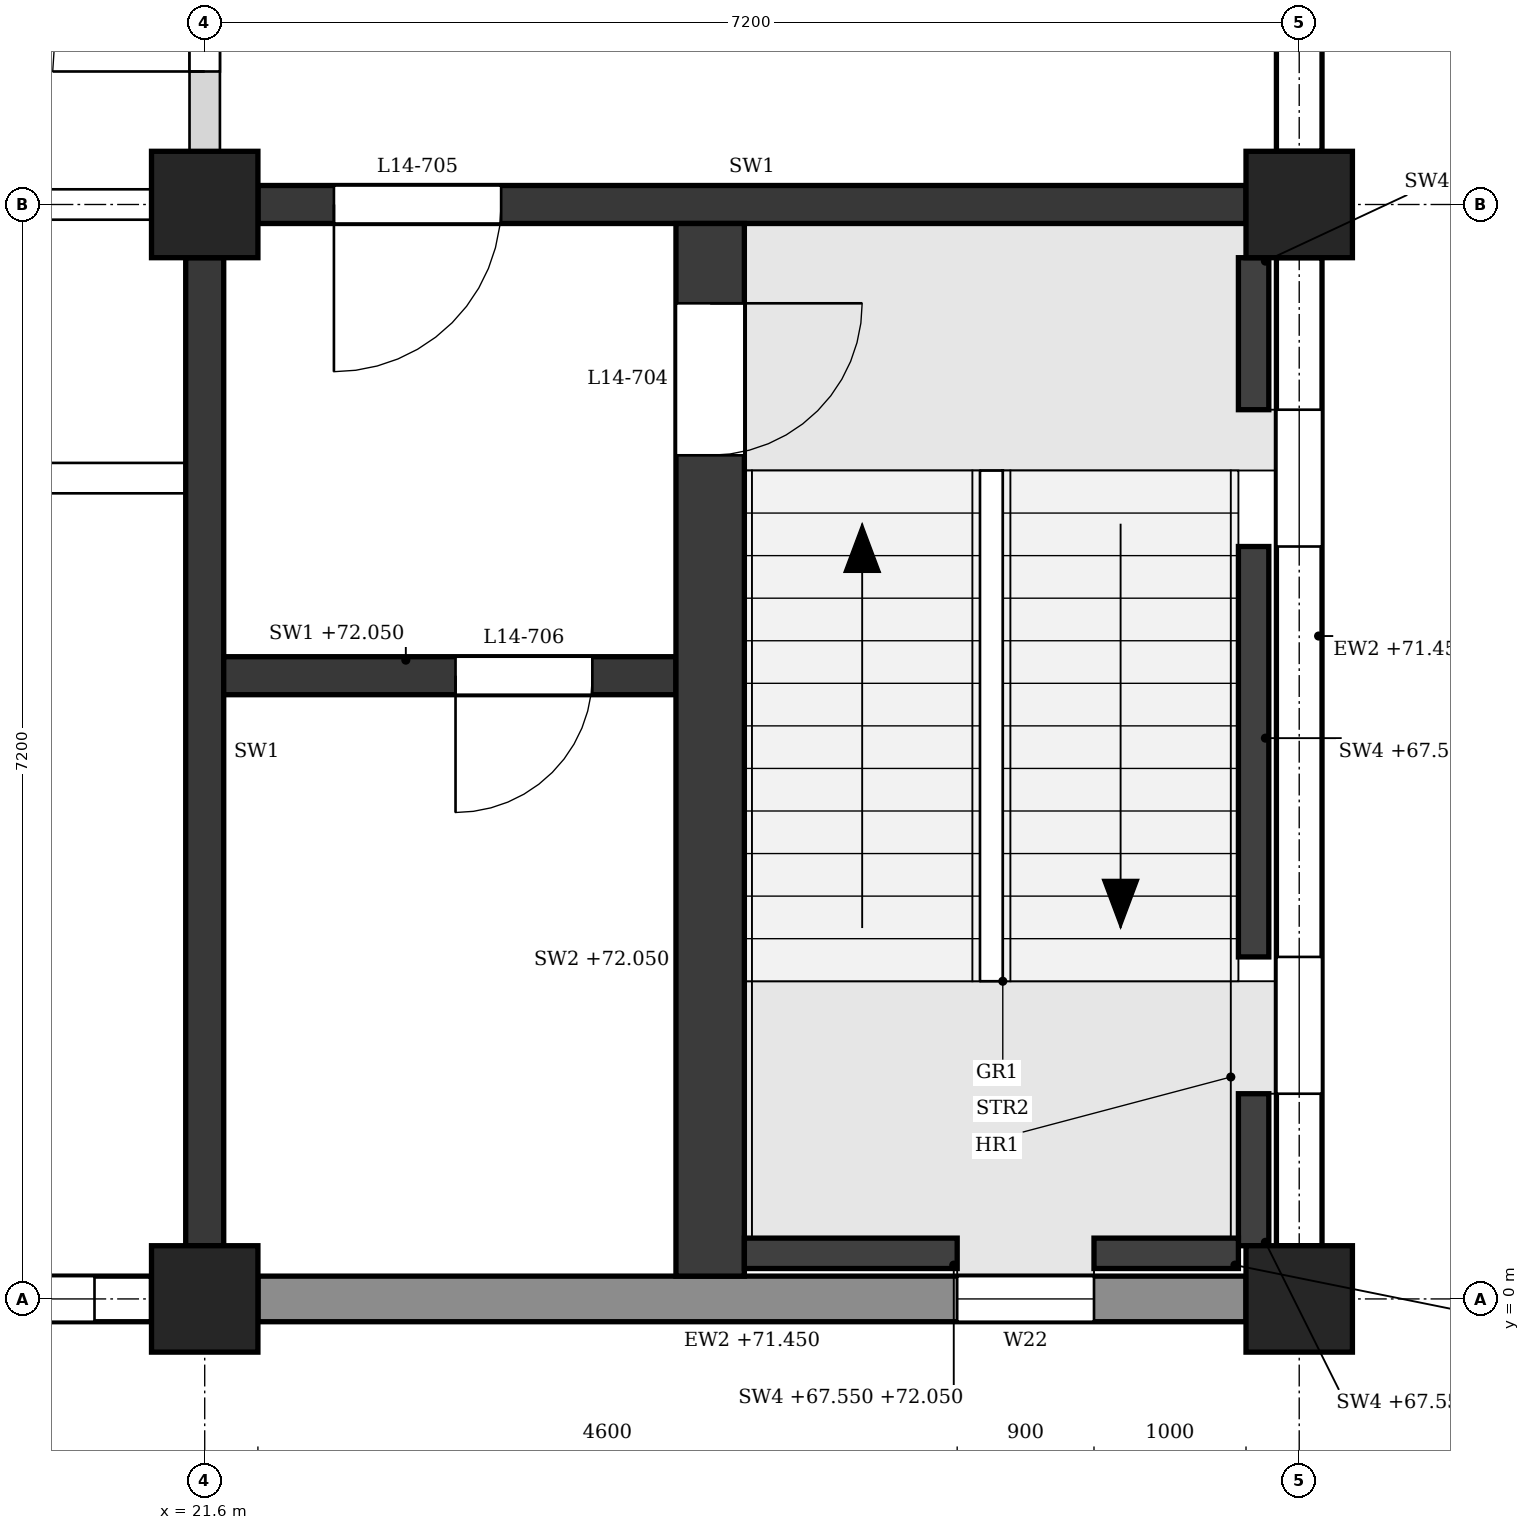
"""IFC4 building model, lengths in metres.
Left out: names, types, materials, properties, quantities, classifications, styles, units other than length and angle.
Written with IfcOpenShell. Run it as: python <this file> out.ifc"""

import sys

from ifc_helpers import new_model, si_unit, direction, frame, frame_2d, origin, origin_2d, place, context, subcontext, project, spatial, polyline, rectangle, outline, extrude, element, fill, save


model = new_model("IFC4")
c1 = context("Model", 3, precision=1e-05, world=origin(), true_north=direction((0.0, 1.0)))
c2 = subcontext(c1, "Body", "Model", "MODEL_VIEW")
j1 = project(units=[si_unit("LENGTHUNIT", "METRE"), si_unit("PLANEANGLEUNIT", "RADIAN")], contexts=[c1])
p1 = place(None, origin())
s1 = spatial("IfcSite", under=j1, at=p1, CompositionType="ELEMENT")
p2 = place(p1, origin())
s2 = spatial("IfcBuilding", under=s1, at=p2, CompositionType="ELEMENT")
p3 = place(p2, frame((0.0, 0.0, 67.8)))
s3 = spatial("IfcBuildingStorey", under=s2, at=p3, CompositionType="ELEMENT", Elevation=67.8)
for number, where, z_axis, x_axis in (
    (1, (21.6, 0.0, 0.0), (0.0, 0.0, 1.0), (1.0, 0.0, 0.0)),
    (2, (21.6, 7.2, 0.0), (0.0, 0.0, 1.0), (1.0, 0.0, 0.0)),
    (3, (28.8, 0.0, 0.0), (0.0, 0.0, 1.0), (1.0, 0.0, 0.0)),
    (4, (28.8, 7.2, 0.0), (0.0, 0.0, 1.0), (1.0, 0.0, 0.0)),
):
    element("IfcColumn", number, at=place(p3, frame(where, z_axis=z_axis, x_axis=x_axis)), inside=s3, PredefinedType="COLUMN", context=c2, shape_type="SweptSolid", body=[
        extrude(rectangle(XDim=0.7, YDim=0.7, at=origin_2d()), origin(), (0.0, 0.0, 1.0), 4.5),
    ])
p4 = place(p3, frame((14.75, 0.0, 0.0), z_axis=(0.0, 0.0, 1.0), x_axis=(1.0, 0.0, 0.0)))
e5 = element("IfcWall", 5, at=p4, inside=s3, PredefinedType="STANDARD", context=c2, shape_type="SweptSolid", body=[
    extrude(rectangle(XDim=6.5, YDim=0.3, at=frame_2d((3.25, 0.0))), origin(), (0.0, 0.0, 1.0), 3.65),
])
p5 = place(p4, frame((0.375, 0.0, 1.5)))
e6 = element("IfcOpeningElement", 6, at=p5, cuts=e5, PredefinedType="OPENING", context=c2, shape_type="SweptSolid", body=[
    extrude(outline(polyline([(0.0, 0.0), (0.45, 0.0), (0.45, 1.85), (0.225, 2.1), (0.0, 1.85), (0.0, 0.0)])), frame((0.0, 0.16, 0.0), z_axis=(0.0, -1.0, 0.0), x_axis=(1.0, 0.0, 0.0)), (0.0, 0.0, 1.0), 0.32),
])
p6 = place(p4, frame((1.075, 0.0, 0.9)))
e7 = element("IfcOpeningElement", 7, at=p6, cuts=e5, PredefinedType="OPENING", context=c2, shape_type="SweptSolid", body=[
    extrude(outline(polyline([(0.0, 0.0), (0.75, 0.0), (0.75, 2.25), (0.375, 2.7), (0.0, 2.25), (0.0, 0.0)])), frame((0.0, 0.16, 0.0), z_axis=(0.0, -1.0, 0.0), x_axis=(1.0, 0.0, 0.0)), (0.0, 0.0, 1.0), 0.32),
])
p7 = place(p4, frame((2.075, 0.0, 1.5)))
e8 = element("IfcOpeningElement", 8, at=p7, cuts=e5, PredefinedType="OPENING", context=c2, shape_type="SweptSolid", body=[
    extrude(outline(polyline([(0.0, 0.0), (0.45, 0.0), (0.45, 1.85), (0.225, 2.1), (0.0, 1.85), (0.0, 0.0)])), frame((0.0, 0.16, 0.0), z_axis=(0.0, -1.0, 0.0), x_axis=(1.0, 0.0, 0.0)), (0.0, 0.0, 1.0), 0.32),
])
p8 = place(p4, frame((3.975, 0.0, 1.5)))
e9 = element("IfcOpeningElement", 9, at=p8, cuts=e5, PredefinedType="OPENING", context=c2, shape_type="SweptSolid", body=[
    extrude(outline(polyline([(0.0, 0.0), (0.45, 0.0), (0.45, 1.85), (0.225, 2.1), (0.0, 1.85), (0.0, 0.0)])), frame((0.0, 0.16, 0.0), z_axis=(0.0, -1.0, 0.0), x_axis=(1.0, 0.0, 0.0)), (0.0, 0.0, 1.0), 0.32),
])
p9 = place(p4, frame((4.675, 0.0, 0.9)))
e10 = element("IfcOpeningElement", 10, at=p9, cuts=e5, PredefinedType="OPENING", context=c2, shape_type="SweptSolid", body=[
    extrude(outline(polyline([(0.0, 0.0), (0.75, 0.0), (0.75, 2.25), (0.375, 2.7), (0.0, 2.25), (0.0, 0.0)])), frame((0.0, 0.16, 0.0), z_axis=(0.0, -1.0, 0.0), x_axis=(1.0, 0.0, 0.0)), (0.0, 0.0, 1.0), 0.32),
])
p10 = place(p4, frame((5.675, 0.0, 1.5)))
e11 = element("IfcOpeningElement", 11, at=p10, cuts=e5, PredefinedType="OPENING", context=c2, shape_type="SweptSolid", body=[
    extrude(outline(polyline([(0.0, 0.0), (0.45, 0.0), (0.45, 1.85), (0.225, 2.1), (0.0, 1.85), (0.0, 0.0)])), frame((0.0, 0.16, 0.0), z_axis=(0.0, -1.0, 0.0), x_axis=(1.0, 0.0, 0.0)), (0.0, 0.0, 1.0), 0.32),
])
p11 = place(p3, frame((21.95, 0.0, 0.0), z_axis=(0.0, 0.0, 1.0), x_axis=(1.0, 0.0, 0.0)))
e12 = element("IfcWall", 12, at=p11, inside=s3, PredefinedType="STANDARD", context=c2, shape_type="SweptSolid", body=[
    extrude(rectangle(XDim=6.5, YDim=0.3, at=frame_2d((3.25, 0.0))), origin(), (0.0, 0.0, 1.0), 3.65),
])
p12 = place(p11, frame((4.6, 0.0, 0.9)))
e13 = element("IfcOpeningElement", 13, at=p12, cuts=e12, PredefinedType="OPENING", context=c2, shape_type="SweptSolid", body=[
    extrude(outline(polyline([(0.0, 0.0), (0.9, 0.0), (0.9, 2.25), (0.45, 2.7), (0.0, 2.25), (0.0, 0.0)])), frame((0.0, 0.16, 0.0), z_axis=(0.0, -1.0, 0.0), x_axis=(1.0, 0.0, 0.0)), (0.0, 0.0, 1.0), 0.32),
])
p13 = place(p3, frame((28.8, 0.35, 0.0), z_axis=(0.0, 0.0, 1.0), x_axis=(0.0, 1.0, 0.0)))
e14 = element("IfcWall", 14, at=p13, inside=s3, PredefinedType="STANDARD", context=c2, shape_type="SweptSolid", body=[
    extrude(rectangle(XDim=6.5, YDim=0.3, at=frame_2d((3.25, 0.0))), origin(), (0.0, 0.0, 1.0), 3.65),
])
p14 = place(p13, frame((1.0, 0.0, 0.9)))
e15 = element("IfcOpeningElement", 15, at=p14, cuts=e14, PredefinedType="OPENING", context=c2, shape_type="SweptSolid", body=[
    extrude(outline(polyline([(0.0, 0.0), (0.9, 0.0), (0.9, 2.25), (0.45, 2.7), (0.0, 2.25), (0.0, 0.0)])), frame((0.0, 0.16, 0.0), z_axis=(0.0, -1.0, 0.0), x_axis=(1.0, 0.0, 0.0)), (0.0, 0.0, 1.0), 0.32),
])
p15 = place(p13, frame((4.6, 0.0, 0.9)))
e16 = element("IfcOpeningElement", 16, at=p15, cuts=e14, PredefinedType="OPENING", context=c2, shape_type="SweptSolid", body=[
    extrude(outline(polyline([(0.0, 0.0), (0.9, 0.0), (0.9, 2.25), (0.45, 2.7), (0.0, 2.25), (0.0, 0.0)])), frame((0.0, 0.16, 0.0), z_axis=(0.0, -1.0, 0.0), x_axis=(1.0, 0.0, 0.0)), (0.0, 0.0, 1.0), 0.32),
])
p16 = place(p3, frame((28.8, 7.55, 0.0), z_axis=(0.0, 0.0, 1.0), x_axis=(0.0, 1.0, 0.0)))
e17 = element("IfcWall", 17, at=p16, inside=s3, PredefinedType="STANDARD", context=c2, shape_type="SweptSolid", body=[
    extrude(rectangle(XDim=6.5, YDim=0.3, at=frame_2d((3.25, 0.0))), origin(), (0.0, 0.0, 1.0), 3.65),
])
p17 = place(p16, frame((0.7, 0.0, 0.9)))
e18 = element("IfcOpeningElement", 18, at=p17, cuts=e17, PredefinedType="OPENING", context=c2, shape_type="SweptSolid", body=[
    extrude(outline(polyline([(0.0, 0.0), (1.5, 0.0), (1.5, 1.95), (0.75, 2.7), (0.0, 1.95), (0.0, 0.0)])), frame((0.0, 0.16, 0.0), z_axis=(0.0, -1.0, 0.0), x_axis=(1.0, 0.0, 0.0)), (0.0, 0.0, 1.0), 0.32),
])
p18 = place(p3, frame((21.95, 7.2, 0.0), z_axis=(0.0, 0.0, 1.0), x_axis=(1.0, 0.0, 0.0)))
e19 = element("IfcWall", 19, at=p18, inside=s3, PredefinedType="SHEAR", context=c2, shape_type="SweptSolid", body=[
    extrude(rectangle(XDim=6.5, YDim=0.25, at=frame_2d((3.25, 0.0))), origin(), (0.0, 0.0, 1.0), 3.6),
])
p19 = place(p18, frame((0.5, 0.0, 0.0)))
e20 = element("IfcOpeningElement", 20, at=p19, cuts=e19, PredefinedType="OPENING", context=c2, shape_type="SweptSolid", body=[
    extrude(rectangle(XDim=1.1, YDim=2.1, at=frame_2d((0.55, 1.05))), frame((0.0, 0.135, 0.0), z_axis=(0.0, -1.0, 0.0), x_axis=(1.0, 0.0, 0.0)), (0.0, 0.0, 1.0), 0.27),
])
p20 = place(p3, frame((21.6, 0.35, 0.0), z_axis=(0.0, 0.0, 1.0), x_axis=(0.0, 1.0, 0.0)))
e21 = element("IfcWall", 21, at=p20, inside=s3, PredefinedType="SHEAR", context=c2, shape_type="SweptSolid", body=[
    extrude(rectangle(XDim=6.5, YDim=0.25, at=frame_2d((3.25, 0.0))), origin(), (0.0, 0.0, 1.0), 3.6),
])
p21 = place(p3, frame((28.5, 0.35, -0.25), z_axis=(0.0, 0.0, 1.0), x_axis=(0.0, 1.0, 0.0)))
e22 = element("IfcWall", 22, at=p21, inside=s3, PredefinedType="SHEAR", context=c2, shape_type="SweptSolid", body=[
    extrude(rectangle(XDim=1.0, YDim=0.2, at=frame_2d((0.5, 0.0))), origin(), (0.0, 0.0, 1.0), 4.5),
])
p22 = place(p3, frame((28.5, 2.25, -0.25), z_axis=(0.0, 0.0, 1.0), x_axis=(0.0, 1.0, 0.0)))
e23 = element("IfcWall", 23, at=p22, inside=s3, PredefinedType="SHEAR", context=c2, shape_type="SweptSolid", body=[
    extrude(rectangle(XDim=2.7, YDim=0.2, at=frame_2d((1.35, 0.0))), origin(), (0.0, 0.0, 1.0), 4.5),
])
p23 = place(p3, frame((28.5, 5.85, -0.25), z_axis=(0.0, 0.0, 1.0), x_axis=(0.0, 1.0, 0.0)))
e24 = element("IfcWall", 24, at=p23, inside=s3, PredefinedType="SHEAR", context=c2, shape_type="SweptSolid", body=[
    extrude(rectangle(XDim=1.0, YDim=0.2, at=frame_2d((0.5, 0.0))), origin(), (0.0, 0.0, 1.0), 4.5),
])
p24 = place(p3, frame((25.15, 0.3, -0.25), z_axis=(0.0, 0.0, 1.0), x_axis=(1.0, 0.0, 0.0)))
e25 = element("IfcWall", 25, at=p24, inside=s3, PredefinedType="SHEAR", context=c2, shape_type="SweptSolid", body=[
    extrude(rectangle(XDim=1.4, YDim=0.2, at=frame_2d((0.7, 0.0))), origin(), (0.0, 0.0, 1.0), 4.5),
])
p25 = place(p3, frame((27.45, 0.3, -0.25), z_axis=(0.0, 0.0, 1.0), x_axis=(1.0, 0.0, 0.0)))
e26 = element("IfcWall", 26, at=p25, inside=s3, PredefinedType="SHEAR", context=c2, shape_type="SweptSolid", body=[
    extrude(rectangle(XDim=0.95, YDim=0.2, at=frame_2d((0.475, 0.0))), origin(), (0.0, 0.0, 1.0), 4.5),
])
p26 = place(p3, frame((24.925, 0.15, 0.0), z_axis=(0.0, 0.0, 1.0), x_axis=(0.0, 1.0, 0.0)))
e27 = element("IfcWall", 27, at=p26, inside=s3, PredefinedType="SHEAR", context=c2, shape_type="SweptSolid", body=[
    extrude(rectangle(XDim=6.925, YDim=0.45, at=frame_2d((3.462, 0.0))), origin(), (0.0, 0.0, 1.0), 4.25),
])
p27 = place(p26, frame((5.4, 0.0, 0.0)))
e28 = element("IfcOpeningElement", 28, at=p27, cuts=e27, PredefinedType="OPENING", context=c2, shape_type="SweptSolid", body=[
    extrude(rectangle(XDim=1.0, YDim=2.1, at=frame_2d((0.5, 1.05))), frame((0.0, 0.235, 0.0), z_axis=(0.0, -1.0, 0.0), x_axis=(1.0, 0.0, 0.0)), (0.0, 0.0, 1.0), 0.47),
])
p28 = place(p3, frame((21.725, 4.1, 0.0), z_axis=(0.0, 0.0, 1.0), x_axis=(1.0, 0.0, 0.0)))
e29 = element("IfcWall", 29, at=p28, inside=s3, PredefinedType="SHEAR", context=c2, shape_type="SweptSolid", body=[
    extrude(rectangle(XDim=2.975, YDim=0.25, at=frame_2d((1.487, 0.0))), origin(), (0.0, 0.0, 1.0), 4.25),
])
p29 = place(p28, frame((1.525, 0.0, 0.0)))
e30 = element("IfcOpeningElement", 30, at=p29, cuts=e29, PredefinedType="OPENING", context=c2, shape_type="SweptSolid", body=[
    extrude(rectangle(XDim=0.9, YDim=2.1, at=frame_2d((0.45, 1.05))), frame((0.0, 0.135, 0.0), z_axis=(0.0, -1.0, 0.0), x_axis=(1.0, 0.0, 0.0)), (0.0, 0.0, 1.0), 0.27),
])
p30 = place(p3, frame((7.325, 5.4, 0.0), z_axis=(0.0, 0.0, 1.0), x_axis=(1.0, 0.0, 0.0)))
e31 = element("IfcWall", 31, at=p30, inside=s3, PredefinedType="PARTITIONING", context=c2, shape_type="SweptSolid", body=[
    extrude(outline(polyline([(0.0, 0.0), (14.15, 0.0), (14.15, 3.6), (14.075, 3.6), (14.075, 4.25), (7.275, 4.25), (7.275, 3.6), (6.875, 3.6), (6.875, 4.25), (0.075, 4.25), (0.075, 3.6), (0.0, 3.6), (0.0, 0.0)])), frame((0.0, 0.1, 0.0), z_axis=(0.0, -1.0, 0.0), x_axis=(1.0, 0.0, 0.0)), (0.0, 0.0, 1.0), 0.2),
])
p31 = place(p30, frame((1.238, 0.0, 0.0)))
e32 = element("IfcOpeningElement", 32, at=p31, cuts=e31, PredefinedType="OPENING", context=c2, shape_type="SweptSolid", body=[
    extrude(rectangle(XDim=1.0, YDim=2.1, at=frame_2d((0.5, 1.05))), frame((0.0, 0.11, 0.0), z_axis=(0.0, -1.0, 0.0), x_axis=(1.0, 0.0, 0.0)), (0.0, 0.0, 1.0), 0.22),
])
p32 = place(p30, frame((4.775, 0.0, 0.0)))
e33 = element("IfcOpeningElement", 33, at=p32, cuts=e31, PredefinedType="OPENING", context=c2, shape_type="SweptSolid", body=[
    extrude(rectangle(XDim=1.0, YDim=2.1, at=frame_2d((0.5, 1.05))), frame((0.0, 0.11, 0.0), z_axis=(0.0, -1.0, 0.0), x_axis=(1.0, 0.0, 0.0)), (0.0, 0.0, 1.0), 0.22),
])
p33 = place(p30, frame((8.375, 0.0, 0.0)))
e34 = element("IfcOpeningElement", 34, at=p33, cuts=e31, PredefinedType="OPENING", context=c2, shape_type="SweptSolid", body=[
    extrude(rectangle(XDim=1.0, YDim=2.1, at=frame_2d((0.5, 1.05))), frame((0.0, 0.11, 0.0), z_axis=(0.0, -1.0, 0.0), x_axis=(1.0, 0.0, 0.0)), (0.0, 0.0, 1.0), 0.22),
])
p34 = place(p30, frame((11.913, 0.0, 0.0)))
e35 = element("IfcOpeningElement", 35, at=p34, cuts=e31, PredefinedType="OPENING", context=c2, shape_type="SweptSolid", body=[
    extrude(rectangle(XDim=1.0, YDim=2.1, at=frame_2d((0.5, 1.05))), frame((0.0, 0.11, 0.0), z_axis=(0.0, -1.0, 0.0), x_axis=(1.0, 0.0, 0.0)), (0.0, 0.0, 1.0), 0.22),
])
p35 = place(p3, frame((14.75, 7.2, 0.0), z_axis=(0.0, 0.0, 1.0), x_axis=(1.0, 0.0, 0.0)))
e36 = element("IfcWall", 36, at=p35, inside=s3, PredefinedType="PARTITIONING", context=c2, shape_type="SweptSolid", body=[
    extrude(rectangle(XDim=6.5, YDim=0.2, at=frame_2d((3.25, 0.0))), origin(), (0.0, 0.0, 1.0), 3.6),
])
p36 = place(p35, frame((4.375, 0.0, 0.0)))
e37 = element("IfcOpeningElement", 37, at=p36, cuts=e36, PredefinedType="OPENING", context=c2, shape_type="SweptSolid", body=[
    extrude(rectangle(XDim=1.0, YDim=2.1, at=frame_2d((0.5, 1.05))), frame((0.0, 0.11, 0.0), z_axis=(0.0, -1.0, 0.0), x_axis=(1.0, 0.0, 0.0)), (0.0, 0.0, 1.0), 0.22),
])
p37 = place(p3, frame((21.6, 7.55, 0.0), z_axis=(0.0, 0.0, 1.0), x_axis=(0.0, 1.0, 0.0)))
e38 = element("IfcWall", 38, at=p37, inside=s3, PredefinedType="PARTITIONING", context=c2, shape_type="SweptSolid", body=[
    extrude(rectangle(XDim=2.775, YDim=0.2, at=frame_2d((1.387, 0.0))), origin(), (0.0, 0.0, 1.0), 3.6),
])
p38 = place(p37, frame((0.525, 0.0, 0.0)))
e39 = element("IfcOpeningElement", 39, at=p38, cuts=e38, PredefinedType="OPENING", context=c2, shape_type="SweptSolid", body=[
    extrude(rectangle(XDim=1.0, YDim=2.1, at=frame_2d((0.5, 1.05))), frame((0.0, 0.11, 0.0), z_axis=(0.0, -1.0, 0.0), x_axis=(1.0, 0.0, 0.0)), (0.0, 0.0, 1.0), 0.22),
])
p39 = place(p14, origin())
e40 = element("IfcWindow", 40, at=p39, inside=s3, PartitioningType="SINGLE_PANEL", PredefinedType="WINDOW", context=c2, shape_type="SweptSolid", body=[
    extrude(outline(polyline([(0.0, 0.0), (0.9, 0.0), (0.9, 2.25), (0.45, 2.7), (0.0, 2.25), (0.0, 0.0)])), frame((0.0, 0.03, 0.0), z_axis=(0.0, -1.0, 0.0), x_axis=(1.0, 0.0, 0.0)), (0.0, 0.0, 1.0), 0.06),
])
fill(e15, e40)
p40 = place(p15, origin())
e41 = element("IfcWindow", 41, at=p40, inside=s3, PartitioningType="SINGLE_PANEL", PredefinedType="WINDOW", context=c2, shape_type="SweptSolid", body=[
    extrude(outline(polyline([(0.0, 0.0), (0.9, 0.0), (0.9, 2.25), (0.45, 2.7), (0.0, 2.25), (0.0, 0.0)])), frame((0.0, 0.03, 0.0), z_axis=(0.0, -1.0, 0.0), x_axis=(1.0, 0.0, 0.0)), (0.0, 0.0, 1.0), 0.06),
])
fill(e16, e41)
p41 = place(p10, origin())
e42 = element("IfcWindow", 42, at=p41, inside=s3, PartitioningType="SINGLE_PANEL", PredefinedType="WINDOW", context=c2, shape_type="SweptSolid", body=[
    extrude(outline(polyline([(0.0, 0.0), (0.45, 0.0), (0.45, 1.85), (0.225, 2.1), (0.0, 1.85), (0.0, 0.0)])), frame((0.0, 0.03, 0.0), z_axis=(0.0, -1.0, 0.0), x_axis=(1.0, 0.0, 0.0)), (0.0, 0.0, 1.0), 0.06),
])
fill(e11, e42)
p42 = place(p12, origin())
e43 = element("IfcWindow", 43, at=p42, inside=s3, PartitioningType="SINGLE_PANEL", PredefinedType="WINDOW", context=c2, shape_type="SweptSolid", body=[
    extrude(outline(polyline([(0.0, 0.0), (0.9, 0.0), (0.9, 2.25), (0.45, 2.7), (0.0, 2.25), (0.0, 0.0)])), frame((0.0, 0.03, 0.0), z_axis=(0.0, -1.0, 0.0), x_axis=(1.0, 0.0, 0.0)), (0.0, 0.0, 1.0), 0.06),
])
fill(e13, e43)
p43 = place(p27, frame((1.0, 0.0, 0.0), z_axis=(0.0, 0.0, 1.0), x_axis=(-1.0, 0.0, 0.0)))
e44 = element("IfcDoor", 44, at=p43, inside=s3, OperationType="SINGLE_SWING_LEFT", PredefinedType="DOOR", context=c2, shape_type="SweptSolid", body=[
    extrude(rectangle(XDim=1.0, YDim=2.1, at=frame_2d((0.5, 1.05))), frame((0.0, 0.025, 0.0), z_axis=(0.0, -1.0, 0.0), x_axis=(1.0, 0.0, 0.0)), (0.0, 0.0, 1.0), 0.05),
])
fill(e28, e44)
p44 = place(p19, frame((1.1, 0.0, 0.0), z_axis=(0.0, 0.0, 1.0), x_axis=(-1.0, 0.0, 0.0)))
e45 = element("IfcDoor", 45, at=p44, inside=s3, OperationType="SINGLE_SWING_RIGHT", PredefinedType="DOOR", context=c2, shape_type="SweptSolid", body=[
    extrude(rectangle(XDim=1.1, YDim=2.1, at=frame_2d((0.55, 1.05))), frame((0.0, 0.025, 0.0), z_axis=(0.0, -1.0, 0.0), x_axis=(1.0, 0.0, 0.0)), (0.0, 0.0, 1.0), 0.05),
])
fill(e20, e45)
p45 = place(p29, frame((0.9, 0.0, 0.0), z_axis=(0.0, 0.0, 1.0), x_axis=(-1.0, 0.0, 0.0)))
e46 = element("IfcDoor", 46, at=p45, inside=s3, OperationType="SINGLE_SWING_RIGHT", PredefinedType="DOOR", context=c2, shape_type="SweptSolid", body=[
    extrude(rectangle(XDim=0.9, YDim=2.1, at=frame_2d((0.45, 1.05))), frame((0.0, 0.025, 0.0), z_axis=(0.0, -1.0, 0.0), x_axis=(1.0, 0.0, 0.0)), (0.0, 0.0, 1.0), 0.05),
])
fill(e30, e46)
p46 = place(p38, origin())
e47 = element("IfcDoor", 47, at=p46, inside=s3, OperationType="SINGLE_SWING_LEFT", PredefinedType="DOOR", context=c2, shape_type="SweptSolid", body=[
    extrude(rectangle(XDim=1.0, YDim=2.1, at=frame_2d((0.5, 1.05))), frame((0.0, 0.025, 0.0), z_axis=(0.0, -1.0, 0.0), x_axis=(1.0, 0.0, 0.0)), (0.0, 0.0, 1.0), 0.05),
])
fill(e39, e47)
save(model, sys.argv[1])
